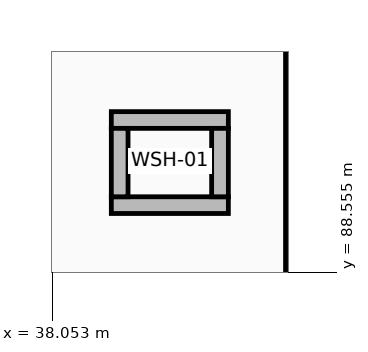
"""IFC4 building model, lengths in metres.
Left out: names, types, materials, properties, quantities, classifications, styles, units other than length and angle.
Written with IfcOpenShell. Run it as: python <this file> out.ifc"""

import sys

from ifc_helpers import new_model, si_unit, direction, frame, frame_2d, origin, place, context, subcontext, project, spatial, rectangle, extrude, element, save


model = new_model("IFC4")
c1 = context("Model", 3, precision=1e-05, world=origin(), true_north=direction((0.0, 1.0)))
c2 = subcontext(c1, "Body", "Model", "MODEL_VIEW")
j1 = project(units=[si_unit("LENGTHUNIT", "METRE"), si_unit("PLANEANGLEUNIT", "RADIAN")], contexts=[c1])
p1 = place(None, origin())
s1 = spatial("IfcSite", under=j1, at=p1, CompositionType="ELEMENT")
p2 = place(p1, origin())
s2 = spatial("IfcBuilding", under=s1, at=p2, CompositionType="ELEMENT")
p3 = place(p2, origin())
s3 = spatial("IfcBuildingStorey", under=s2, at=p3, CompositionType="ELEMENT", Elevation=0.0)
for number, where, z_axis, x_axis in (
    (1, (38.83, 89.44, 0.0), (0.0, 0.0, 1.0), (1.0, 0.0, 0.0)),
    (2, (38.83, 90.56, 0.0), (0.0, 0.0, 1.0), (1.0, 0.0, 0.0)),
):
    element("IfcWall", number, at=place(p3, frame(where, z_axis=z_axis, x_axis=x_axis)), inside=s3, PredefinedType="STANDARD", context=c2, shape_type="SweptSolid", body=[
        extrude(rectangle(XDim=1.54, YDim=0.22, at=frame_2d((0.77, 0.0))), origin(), (0.0, 0.0, 1.0), 2.6),
    ])
for number, where, z_axis, x_axis in (
    (3, (38.94, 89.55, 0.0), (0.0, 0.0, 1.0), (0.0, 1.0, 0.0)),
    (4, (40.26, 89.55, 0.0), (0.0, 0.0, 1.0), (0.0, 1.0, 0.0)),
):
    element("IfcWall", number, at=place(p3, frame(where, z_axis=z_axis, x_axis=x_axis)), inside=s3, PredefinedType="STANDARD", context=c2, shape_type="SweptSolid", body=[
        extrude(rectangle(XDim=0.9, YDim=0.22, at=frame_2d((0.45, 0.0))), origin(), (0.0, 0.0, 1.0), 2.6),
    ])
p4 = place(p3, frame((41.2, 64.987, 0.0), z_axis=(0.0, 0.0, 1.0), x_axis=(0.0, 1.0, 0.0)))
e5 = element("IfcWall", 5, at=p4, inside=s3, PredefinedType="PARTITIONING", context=c2, shape_type="SweptSolid", body=[
    extrude(rectangle(XDim=28.259, YDim=0.155, at=frame_2d((14.129, 0.0))), origin(), (0.0, 0.0, 1.0), 2.6),
])
save(model, sys.argv[1])
